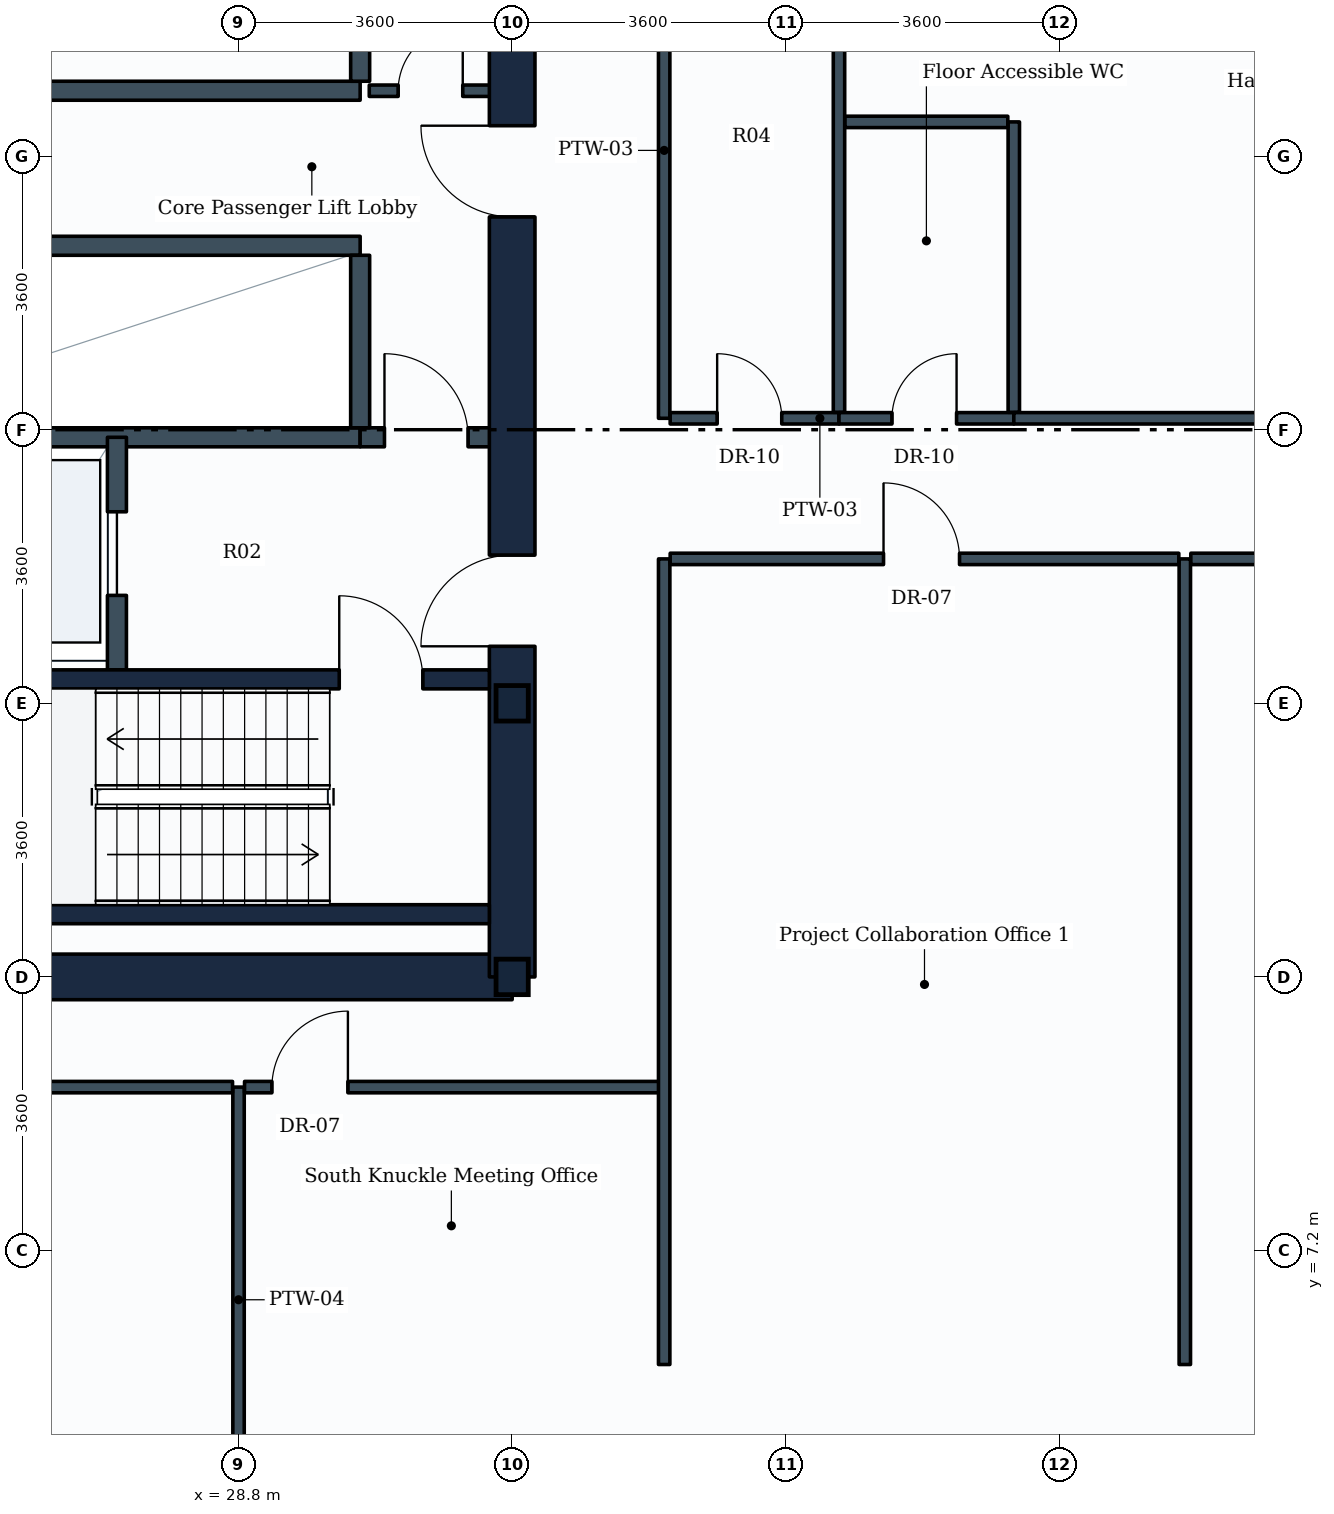
"""IFC4 building model, lengths in metres.
Left out: names, types, materials, properties, quantities, classifications, styles, units other than length and angle.
Written with IfcOpenShell. Run it as: python <this file> out.ifc"""

import sys

from ifc_helpers import new_model, si_unit, direction, frame, frame_2d, origin, origin_2d, place, context, subcontext, project, spatial, rectangle, i_section, extrude, element, fill, save


model = new_model("IFC4")
c1 = context("Model", 3, precision=1e-05, world=origin(), true_north=direction((0.0, 1.0)))
c2 = subcontext(c1, "Body", "Model", "MODEL_VIEW")
j1 = project(units=[si_unit("LENGTHUNIT", "METRE"), si_unit("PLANEANGLEUNIT", "RADIAN")], contexts=[c1])
p1 = place(None, origin())
s1 = spatial("IfcSite", under=j1, at=p1, CompositionType="ELEMENT")
p2 = place(p1, origin())
s2 = spatial("IfcBuilding", under=s1, at=p2, CompositionType="ELEMENT")
p3 = place(p2, frame((0.0, 0.0, 24.0)))
s3 = spatial("IfcBuildingStorey", under=s2, at=p3, CompositionType="ELEMENT", Elevation=24.0)
for number, where, z_axis, x_axis in (
    (1, (32.4, 10.8, 0.0), (0.0, 0.0, 1.0), (1.0, 0.0, 0.0)),
    (2, (32.4, 14.4, 0.0), (0.0, 0.0, 1.0), (1.0, 0.0, 0.0)),
):
    element("IfcColumn", number, at=place(p3, frame(where, z_axis=z_axis, x_axis=x_axis)), inside=s3, PredefinedType="COLUMN", context=c2, shape_type="SweptSolid", body=[
        extrude(i_section(OverallWidth=0.424, OverallDepth=0.467, WebThickness=0.033, FlangeThickness=0.053, FilletRadius=0.015, at=origin_2d()), origin(), (0.0, 0.0, 1.0), 3.9),
    ])
p4 = place(p3, frame((14.4, 10.8, 0.0), z_axis=(0.0, 0.0, 1.0), x_axis=(1.0, 0.0, 0.0)))
e3 = element("IfcWall", 3, at=p4, inside=s3, PredefinedType="SHEAR", context=c2, shape_type="SweptSolid", body=[
    extrude(rectangle(XDim=18.0, YDim=0.6, at=frame_2d((9.0, 0.0))), origin(), (0.0, 0.0, 1.0), 3.65),
])
p5 = place(p3, frame((32.4, 10.8, 0.0), z_axis=(0.0, 0.0, 1.0), x_axis=(0.0, 1.0, 0.0)))
e4 = element("IfcWall", 4, at=p5, inside=s3, PredefinedType="SHEAR", context=c2, shape_type="SweptSolid", body=[
    extrude(rectangle(XDim=14.4, YDim=0.6, at=frame_2d((7.2, 0.0))), origin(), (0.0, 0.0, 1.0), 3.65),
])
p6 = place(p5, frame((4.35, 0.0, 0.0)))
e5 = element("IfcOpeningElement", 5, at=p6, cuts=e4, PredefinedType="OPENING", context=c2, shape_type="SweptSolid", body=[
    extrude(rectangle(XDim=1.2, YDim=2.1, at=frame_2d((0.6, 1.05))), frame((0.0, 0.31, 0.0), z_axis=(0.0, -1.0, 0.0), x_axis=(1.0, 0.0, 0.0)), (0.0, 0.0, 1.0), 0.62),
])
p7 = place(p5, frame((10.0, 0.0, 0.0)))
e6 = element("IfcOpeningElement", 6, at=p7, cuts=e4, PredefinedType="OPENING", context=c2, shape_type="SweptSolid", body=[
    extrude(rectangle(XDim=1.2, YDim=2.1, at=frame_2d((0.6, 1.05))), frame((0.0, 0.31, 0.0), z_axis=(0.0, -1.0, 0.0), x_axis=(1.0, 0.0, 0.0)), (0.0, 0.0, 1.0), 0.62),
])
p8 = place(p3, frame((23.35, 11.625, 0.0), z_axis=(0.0, 0.0, 1.0), x_axis=(1.0, 0.0, 0.0)))
e7 = element("IfcWall", 7, at=p8, inside=s3, PredefinedType="SHEAR", context=c2, shape_type="SweptSolid", body=[
    extrude(rectangle(XDim=8.75, YDim=0.25, at=frame_2d((4.375, 0.0))), origin(), (0.0, 0.0, 1.0), 3.65),
])
p9 = place(p3, frame((23.35, 14.715, 0.0), z_axis=(0.0, 0.0, 1.0), x_axis=(1.0, 0.0, 0.0)))
e8 = element("IfcWall", 8, at=p9, inside=s3, PredefinedType="SHEAR", context=c2, shape_type="SweptSolid", body=[
    extrude(rectangle(XDim=8.75, YDim=0.25, at=frame_2d((4.375, 0.0))), origin(), (0.0, 0.0, 1.0), 3.65),
])
p10 = place(p9, frame((6.775, 0.0, 0.0)))
e9 = element("IfcOpeningElement", 9, at=p10, cuts=e8, PredefinedType="OPENING", context=c2, shape_type="SweptSolid", body=[
    extrude(rectangle(XDim=1.1, YDim=2.1, at=frame_2d((0.55, 1.05))), frame((0.0, 0.135, 0.0), z_axis=(0.0, -1.0, 0.0), x_axis=(1.0, 0.0, 0.0)), (0.0, 0.0, 1.0), 0.27),
])
p11 = place(p3, frame((21.88, 17.9, 0.0), z_axis=(0.0, 0.0, 1.0), x_axis=(1.0, 0.0, 0.0)))
e10 = element("IfcWall", 10, at=p11, inside=s3, PredefinedType="PARTITIONING", context=c2, shape_type="SweptSolid", body=[
    extrude(rectangle(XDim=8.52, YDim=0.25, at=frame_2d((4.26, 0.0))), origin(), (0.0, 0.0, 1.0), 3.635),
])
p12 = place(p3, frame((30.4, 17.9, 0.0), z_axis=(0.0, 0.0, 1.0), x_axis=(1.0, 0.0, 0.0)))
e11 = element("IfcWall", 11, at=p12, inside=s3, PredefinedType="PARTITIONING", context=c2, shape_type="SweptSolid", body=[
    extrude(rectangle(XDim=1.75, YDim=0.25, at=frame_2d((0.875, 0.0))), origin(), (0.0, 0.0, 1.0), 3.635),
])
p13 = place(p12, frame((0.32, 0.0, 0.0)))
e12 = element("IfcOpeningElement", 12, at=p13, cuts=e11, PredefinedType="OPENING", context=c2, shape_type="SweptSolid", body=[
    extrude(rectangle(XDim=1.1, YDim=2.1, at=frame_2d((0.55, 1.05))), frame((0.0, 0.135, 0.0), z_axis=(0.0, -1.0, 0.0), x_axis=(1.0, 0.0, 0.0)), (0.0, 0.0, 1.0), 0.27),
])
p14 = place(p3, frame((27.2, 14.84, 0.0), z_axis=(0.0, 0.0, 1.0), x_axis=(0.0, 1.0, 0.0)))
e13 = element("IfcWall", 13, at=p14, inside=s3, PredefinedType="PARTITIONING", context=c2, shape_type="SweptSolid", body=[
    extrude(rectangle(XDim=3.06, YDim=0.25, at=frame_2d((1.53, 0.0))), origin(), (0.0, 0.0, 1.0), 3.635),
])
p15 = place(p14, frame((0.98, 0.0, 0.0)))
e14 = element("IfcOpeningElement", 14, at=p15, cuts=e13, PredefinedType="OPENING", context=c2, shape_type="SweptSolid", body=[
    extrude(rectangle(XDim=1.1, YDim=2.1, at=frame_2d((0.55, 1.05))), frame((0.0, 0.135, 0.0), z_axis=(0.0, -1.0, 0.0), x_axis=(1.0, 0.0, 0.0)), (0.0, 0.0, 1.0), 0.27),
])
p16 = place(p3, frame((23.18, 20.42, 0.0), z_axis=(0.0, 0.0, 1.0), x_axis=(1.0, 0.0, 0.0)))
e15 = element("IfcWall", 15, at=p16, inside=s3, PredefinedType="PARTITIONING", context=c2, shape_type="SweptSolid", body=[
    extrude(rectangle(XDim=7.22, YDim=0.25, at=frame_2d((3.61, 0.0))), origin(), (0.0, 0.0, 1.0), 3.635),
])
p17 = place(p3, frame((30.4, 18.025, 0.0), z_axis=(0.0, 0.0, 1.0), x_axis=(0.0, 1.0, 0.0)))
e16 = element("IfcWall", 16, at=p17, inside=s3, PredefinedType="PARTITIONING", context=c2, shape_type="SweptSolid", body=[
    extrude(rectangle(XDim=2.27, YDim=0.25, at=frame_2d((1.135, 0.0))), origin(), (0.0, 0.0, 1.0), 3.635),
])
p18 = place(p3, frame((23.18, 22.46, 0.0), z_axis=(0.0, 0.0, 1.0), x_axis=(1.0, 0.0, 0.0)))
e17 = element("IfcWall", 17, at=p18, inside=s3, PredefinedType="PARTITIONING", context=c2, shape_type="SweptSolid", body=[
    extrude(rectangle(XDim=7.22, YDim=0.25, at=frame_2d((3.61, 0.0))), origin(), (0.0, 0.0, 1.0), 3.635),
])
p19 = place(p3, frame((30.4, 22.585, 0.0), z_axis=(0.0, 0.0, 1.0), x_axis=(0.0, 1.0, 0.0)))
e18 = element("IfcWall", 18, at=p19, inside=s3, PredefinedType="PARTITIONING", context=c2, shape_type="SweptSolid", body=[
    extrude(rectangle(XDim=2.315, YDim=0.25, at=frame_2d((1.157, 0.0))), origin(), (0.0, 0.0, 1.0), 3.635),
])
p20 = place(p3, frame((30.52, 22.46, 0.0), z_axis=(0.0, 0.0, 1.0), x_axis=(1.0, 0.0, 0.0)))
e19 = element("IfcWall", 19, at=p20, inside=s3, PredefinedType="PARTITIONING", context=c2, shape_type="SweptSolid", body=[
    extrude(rectangle(XDim=1.63, YDim=0.15, at=frame_2d((0.815, 0.0))), origin(), (0.0, 0.0, 1.0), 3.635),
])
p21 = place(p20, frame((0.38, 0.0, 0.0)))
e20 = element("IfcOpeningElement", 20, at=p21, cuts=e19, PredefinedType="OPENING", context=c2, shape_type="SweptSolid", body=[
    extrude(rectangle(XDim=0.85, YDim=2.1, at=frame_2d((0.425, 1.05))), frame((0.0, 0.085, 0.0), z_axis=(0.0, -1.0, 0.0), x_axis=(1.0, 0.0, 0.0)), (0.0, 0.0, 1.0), 0.17),
])
p22 = place(p3, frame((34.4, 18.15, 0.0), z_axis=(0.0, 0.0, 1.0), x_axis=(0.0, 1.0, 0.0)))
e21 = element("IfcWall", 21, at=p22, inside=s3, PredefinedType="PARTITIONING", context=c2, shape_type="SweptSolid", body=[
    extrude(rectangle(XDim=7.05, YDim=0.15, at=frame_2d((3.525, 0.0))), origin(), (0.0, 0.0, 1.0), 2.93),
])
p23 = place(p3, frame((34.479, 18.15, 0.0), z_axis=(0.0, 0.0, 1.0), x_axis=(1.0, 0.0, 0.0)))
e22 = element("IfcWall", 22, at=p23, inside=s3, PredefinedType="PARTITIONING", context=c2, shape_type="SweptSolid", body=[
    extrude(rectangle(XDim=2.221, YDim=0.15, at=frame_2d((1.11, 0.0))), origin(), (0.0, 0.0, 1.0), 3.08),
])
p24 = place(p23, frame((0.618, 0.0, 0.0)))
e23 = element("IfcOpeningElement", 23, at=p24, cuts=e22, PredefinedType="OPENING", context=c2, shape_type="SweptSolid", body=[
    extrude(rectangle(XDim=0.85, YDim=2.1, at=frame_2d((0.425, 1.05))), frame((0.0, 0.085, 0.0), z_axis=(0.0, -1.0, 0.0), x_axis=(1.0, 0.0, 0.0)), (0.0, 0.0, 1.0), 0.17),
])
p25 = place(p3, frame((36.7, 18.229, 0.0), z_axis=(0.0, 0.0, 1.0), x_axis=(0.0, 1.0, 0.0)))
e24 = element("IfcWall", 24, at=p25, inside=s3, PredefinedType="PARTITIONING", context=c2, shape_type="SweptSolid", body=[
    extrude(rectangle(XDim=6.817, YDim=0.15, at=frame_2d((3.408, 0.0))), origin(), (0.0, 0.0, 1.0), 2.93),
])
p26 = place(p3, frame((36.7, 18.15, 0.0), z_axis=(0.0, 0.0, 1.0), x_axis=(1.0, 0.0, 0.0)))
e25 = element("IfcWall", 25, at=p26, inside=s3, PredefinedType="PARTITIONING", context=c2, shape_type="SweptSolid", body=[
    extrude(rectangle(XDim=2.3, YDim=0.15, at=frame_2d((1.15, 0.0))), origin(), (0.0, 0.0, 1.0), 3.08),
])
p27 = place(p26, frame((0.697, 0.0, 0.0)))
e26 = element("IfcOpeningElement", 26, at=p27, cuts=e25, PredefinedType="OPENING", context=c2, shape_type="SweptSolid", body=[
    extrude(rectangle(XDim=0.85, YDim=2.1, at=frame_2d((0.425, 1.05))), frame((0.0, 0.085, 0.0), z_axis=(0.0, -1.0, 0.0), x_axis=(1.0, 0.0, 0.0)), (0.0, 0.0, 1.0), 0.17),
])
p28 = place(p3, frame((39.0, 18.229, 0.0), z_axis=(0.0, 0.0, 1.0), x_axis=(0.0, 1.0, 0.0)))
e27 = element("IfcWall", 27, at=p28, inside=s3, PredefinedType="PARTITIONING", context=c2, shape_type="SweptSolid", body=[
    extrude(rectangle(XDim=3.821, YDim=0.15, at=frame_2d((1.911, 0.0))), origin(), (0.0, 0.0, 1.0), 3.03),
])
p29 = place(p3, frame((36.779, 22.05, 0.0), z_axis=(0.0, 0.0, 1.0), x_axis=(1.0, 0.0, 0.0)))
e28 = element("IfcWall", 28, at=p29, inside=s3, PredefinedType="PARTITIONING", context=c2, shape_type="SweptSolid", body=[
    extrude(rectangle(XDim=2.142, YDim=0.15, at=frame_2d((1.071, 0.0))), origin(), (0.0, 0.0, 1.0), 3.635),
])
p30 = place(p3, frame((28.8, 9.35, 0.0), z_axis=(0.0, 0.0, 1.0), x_axis=(0.0, -1.0, 0.0)))
e29 = element("IfcWall", 29, at=p30, inside=s3, PredefinedType="PARTITIONING", context=c2, shape_type="SweptSolid", body=[
    extrude(rectangle(XDim=5.596, YDim=0.15, at=frame_2d((2.798, 0.0))), origin(), (0.0, 0.0, 1.0), 3.635),
])
p31 = place(p3, frame((12.95, 9.35, 0.0), z_axis=(0.0, 0.0, 1.0), x_axis=(1.0, 0.0, 0.0)))
e30 = element("IfcWall", 30, at=p31, inside=s3, PredefinedType="PARTITIONING", context=c2, shape_type="SweptSolid", body=[
    extrude(rectangle(XDim=15.771, YDim=0.15, at=frame_2d((7.885, 0.0))), origin(), (0.0, 0.0, 1.0), 3.04),
])
p32 = place(p31, frame((4.836, 0.0, 0.0)))
e31 = element("IfcOpeningElement", 31, at=p32, cuts=e30, PredefinedType="OPENING", context=c2, shape_type="SweptSolid", body=[
    extrude(rectangle(XDim=1.0, YDim=2.1, at=frame_2d((0.5, 1.05))), frame((0.0, 0.085, 0.0), z_axis=(0.0, -1.0, 0.0), x_axis=(1.0, 0.0, 0.0)), (0.0, 0.0, 1.0), 0.17),
])
p33 = place(p3, frame((28.879, 9.35, 0.0), z_axis=(0.0, 0.0, 1.0), x_axis=(1.0, 0.0, 0.0)))
e32 = element("IfcWall", 32, at=p33, inside=s3, PredefinedType="PARTITIONING", context=c2, shape_type="SweptSolid", body=[
    extrude(rectangle(XDim=5.521, YDim=0.15, at=frame_2d((2.76, 0.0))), origin(), (0.0, 0.0, 1.0), 3.635),
])
p34 = place(p33, frame((0.36, 0.0, 0.0)))
e33 = element("IfcOpeningElement", 33, at=p34, cuts=e32, PredefinedType="OPENING", context=c2, shape_type="SweptSolid", body=[
    extrude(rectangle(XDim=1.0, YDim=2.1, at=frame_2d((0.5, 1.05))), frame((0.0, 0.085, 0.0), z_axis=(0.0, -1.0, 0.0), x_axis=(1.0, 0.0, 0.0)), (0.0, 0.0, 1.0), 0.17),
])
p35 = place(p3, frame((34.4, 5.7, 0.0), z_axis=(0.0, 0.0, 1.0), x_axis=(0.0, 1.0, 0.0)))
e34 = element("IfcWall", 34, at=p35, inside=s3, PredefinedType="PARTITIONING", context=c2, shape_type="SweptSolid", body=[
    extrude(rectangle(XDim=10.6, YDim=0.15, at=frame_2d((5.3, 0.0))), origin(), (0.0, 0.0, 1.0), 3.08),
])
p36 = place(p3, frame((41.25, 5.7, 0.0), z_axis=(0.0, 0.0, 1.0), x_axis=(0.0, 1.0, 0.0)))
e35 = element("IfcWall", 35, at=p36, inside=s3, PredefinedType="PARTITIONING", context=c2, shape_type="SweptSolid", body=[
    extrude(rectangle(XDim=10.6, YDim=0.15, at=frame_2d((5.3, 0.0))), origin(), (0.0, 0.0, 1.0), 3.03),
])
p37 = place(p3, frame((34.479, 16.3, 0.0), z_axis=(0.0, 0.0, 1.0), x_axis=(1.0, 0.0, 0.0)))
e36 = element("IfcWall", 36, at=p37, inside=s3, PredefinedType="PARTITIONING", context=c2, shape_type="SweptSolid", body=[
    extrude(rectangle(XDim=6.692, YDim=0.15, at=frame_2d((3.346, 0.0))), origin(), (0.0, 0.0, 1.0), 3.04),
])
p38 = place(p37, frame((2.807, 0.0, 0.0)))
e37 = element("IfcOpeningElement", 37, at=p38, cuts=e36, PredefinedType="OPENING", context=c2, shape_type="SweptSolid", body=[
    extrude(rectangle(XDim=1.0, YDim=2.1, at=frame_2d((0.5, 1.05))), frame((0.0, 0.085, 0.0), z_axis=(0.0, -1.0, 0.0), x_axis=(1.0, 0.0, 0.0)), (0.0, 0.0, 1.0), 0.17),
])
p39 = place(p3, frame((41.329, 16.3, 0.0), z_axis=(0.0, 0.0, 1.0), x_axis=(1.0, 0.0, 0.0)))
e38 = element("IfcWall", 38, at=p39, inside=s3, PredefinedType="PARTITIONING", context=c2, shape_type="SweptSolid", body=[
    extrude(rectangle(XDim=7.112, YDim=0.15, at=frame_2d((3.556, 0.0))), origin(), (0.0, 0.0, 1.0), 3.04),
])
p40 = place(p39, frame((4.404, 0.0, 0.0)))
e39 = element("IfcOpeningElement", 39, at=p40, cuts=e38, PredefinedType="OPENING", context=c2, shape_type="SweptSolid", body=[
    extrude(rectangle(XDim=1.0, YDim=2.1, at=frame_2d((0.5, 1.05))), frame((0.0, 0.085, 0.0), z_axis=(0.0, -1.0, 0.0), x_axis=(1.0, 0.0, 0.0)), (0.0, 0.0, 1.0), 0.17),
])
p41 = place(p3, frame((39.0, 18.15, 0.0), z_axis=(0.0, 0.0, 1.0), x_axis=(1.0, 0.0, 0.0)))
e40 = element("IfcWall", 40, at=p41, inside=s3, PredefinedType="PARTITIONING", context=c2, shape_type="SweptSolid", body=[
    extrude(rectangle(XDim=7.981, YDim=0.15, at=frame_2d((3.99, 0.0))), origin(), (0.0, 0.0, 1.0), 3.03),
])
p42 = place(p41, frame((3.53, 0.0, 0.0)))
e41 = element("IfcOpeningElement", 41, at=p42, cuts=e40, PredefinedType="OPENING", context=c2, shape_type="SweptSolid", body=[
    extrude(rectangle(XDim=1.0, YDim=2.1, at=frame_2d((0.5, 1.05))), frame((0.0, 0.085, 0.0), z_axis=(0.0, -1.0, 0.0), x_axis=(1.0, 0.0, 0.0)), (0.0, 0.0, 1.0), 0.17),
])
p43 = place(p10, origin())
e42 = element("IfcDoor", 42, at=p43, inside=s3, OperationType="SINGLE_SWING_LEFT", PredefinedType="DOOR", context=c2, shape_type="SweptSolid", body=[
    extrude(rectangle(XDim=1.1, YDim=2.1, at=frame_2d((0.55, 1.05))), frame((0.0, 0.025, 0.0), z_axis=(0.0, -1.0, 0.0), x_axis=(1.0, 0.0, 0.0)), (0.0, 0.0, 1.0), 0.05),
])
fill(e9, e42)
p44 = place(p15, origin())
e43 = element("IfcDoor", 43, at=p44, inside=s3, OperationType="SLIDING_TO_LEFT", PredefinedType="DOOR", context=c2, shape_type="SweptSolid", body=[
    extrude(rectangle(XDim=1.1, YDim=2.1, at=frame_2d((0.55, 1.05))), frame((0.0, 0.025, 0.0), z_axis=(0.0, -1.0, 0.0), x_axis=(1.0, 0.0, 0.0)), (0.0, 0.0, 1.0), 0.05),
])
fill(e14, e43)
p45 = place(p6, origin())
e44 = element("IfcDoor", 44, at=p45, inside=s3, OperationType="SINGLE_SWING_LEFT", PredefinedType="DOOR", context=c2, shape_type="SweptSolid", body=[
    extrude(rectangle(XDim=1.2, YDim=2.1, at=frame_2d((0.6, 1.05))), frame((0.0, 0.025, 0.0), z_axis=(0.0, -1.0, 0.0), x_axis=(1.0, 0.0, 0.0)), (0.0, 0.0, 1.0), 0.05),
])
fill(e5, e44)
p46 = place(p13, origin())
e45 = element("IfcDoor", 45, at=p46, inside=s3, OperationType="SINGLE_SWING_LEFT", PredefinedType="DOOR", context=c2, shape_type="SweptSolid", body=[
    extrude(rectangle(XDim=1.1, YDim=2.1, at=frame_2d((0.55, 1.05))), frame((0.0, 0.025, 0.0), z_axis=(0.0, -1.0, 0.0), x_axis=(1.0, 0.0, 0.0)), (0.0, 0.0, 1.0), 0.05),
])
fill(e12, e45)
p47 = place(p7, origin())
e46 = element("IfcDoor", 46, at=p47, inside=s3, OperationType="SINGLE_SWING_RIGHT", PredefinedType="DOOR", context=c2, shape_type="SweptSolid", body=[
    extrude(rectangle(XDim=1.2, YDim=2.1, at=frame_2d((0.6, 1.05))), frame((0.0, 0.025, 0.0), z_axis=(0.0, -1.0, 0.0), x_axis=(1.0, 0.0, 0.0)), (0.0, 0.0, 1.0), 0.05),
])
fill(e6, e46)
p48 = place(p21, origin())
e47 = element("IfcDoor", 47, at=p48, inside=s3, OperationType="SINGLE_SWING_RIGHT", PredefinedType="DOOR", context=c2, shape_type="SweptSolid", body=[
    extrude(rectangle(XDim=0.85, YDim=2.1, at=frame_2d((0.425, 1.05))), frame((0.0, 0.025, 0.0), z_axis=(0.0, -1.0, 0.0), x_axis=(1.0, 0.0, 0.0)), (0.0, 0.0, 1.0), 0.05),
])
fill(e20, e47)
p49 = place(p24, origin())
e48 = element("IfcDoor", 48, at=p49, inside=s3, OperationType="SINGLE_SWING_LEFT", PredefinedType="DOOR", context=c2, shape_type="SweptSolid", body=[
    extrude(rectangle(XDim=0.85, YDim=2.1, at=frame_2d((0.425, 1.05))), frame((0.0, 0.025, 0.0), z_axis=(0.0, -1.0, 0.0), x_axis=(1.0, 0.0, 0.0)), (0.0, 0.0, 1.0), 0.05),
])
fill(e23, e48)
p50 = place(p27, origin())
e49 = element("IfcDoor", 49, at=p50, inside=s3, OperationType="SINGLE_SWING_RIGHT", PredefinedType="DOOR", context=c2, shape_type="SweptSolid", body=[
    extrude(rectangle(XDim=0.85, YDim=2.1, at=frame_2d((0.425, 1.05))), frame((0.0, 0.025, 0.0), z_axis=(0.0, -1.0, 0.0), x_axis=(1.0, 0.0, 0.0)), (0.0, 0.0, 1.0), 0.05),
])
fill(e26, e49)
p51 = place(p34, origin())
e50 = element("IfcDoor", 50, at=p51, inside=s3, OperationType="SINGLE_SWING_RIGHT", PredefinedType="DOOR", context=c2, shape_type="SweptSolid", body=[
    extrude(rectangle(XDim=1.0, YDim=2.1, at=frame_2d((0.5, 1.05))), frame((0.0, 0.025, 0.0), z_axis=(0.0, -1.0, 0.0), x_axis=(1.0, 0.0, 0.0)), (0.0, 0.0, 1.0), 0.05),
])
fill(e33, e50)
p52 = place(p38, origin())
e51 = element("IfcDoor", 51, at=p52, inside=s3, OperationType="SINGLE_SWING_LEFT", PredefinedType="DOOR", context=c2, shape_type="SweptSolid", body=[
    extrude(rectangle(XDim=1.0, YDim=2.1, at=frame_2d((0.5, 1.05))), frame((0.0, 0.025, 0.0), z_axis=(0.0, -1.0, 0.0), x_axis=(1.0, 0.0, 0.0)), (0.0, 0.0, 1.0), 0.05),
])
fill(e37, e51)
save(model, sys.argv[1])
